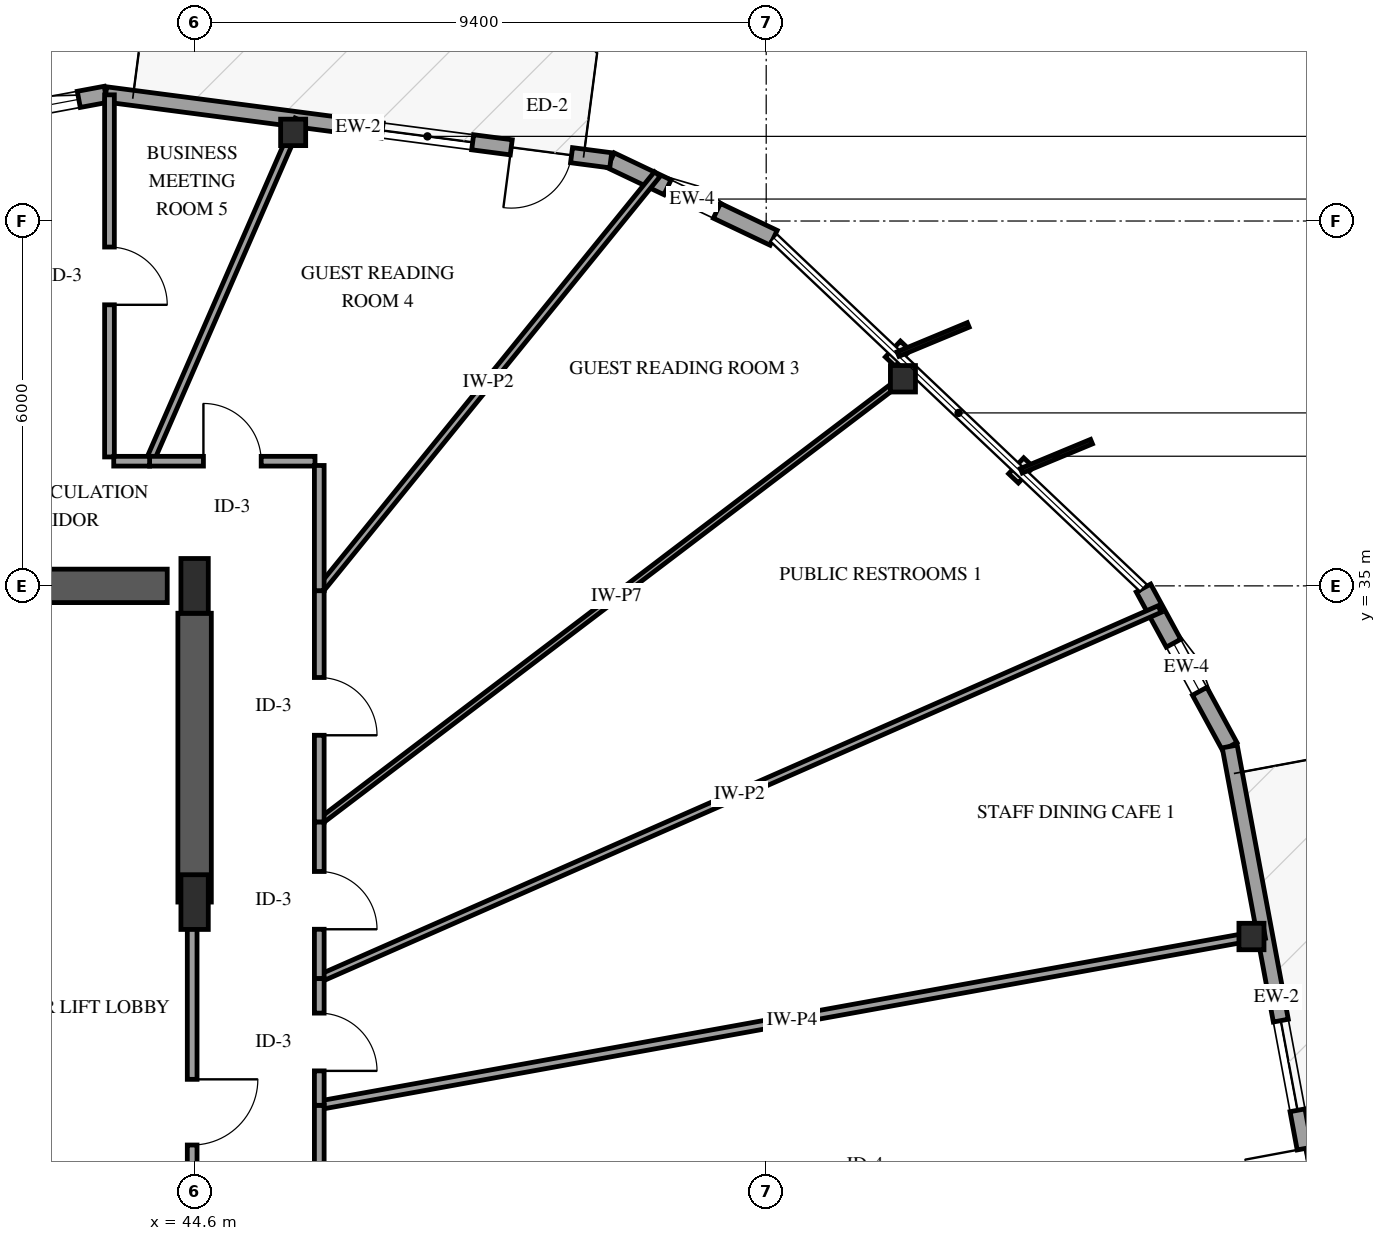
"""IFC4 building model, lengths in metres.
Left out: names, types, materials, properties, quantities, classifications, styles, units other than length and angle.
Written with IfcOpenShell. Run it as: python <this file> out.ifc"""

import sys

from ifc_helpers import new_model, si_unit, direction, frame, frame_2d, origin, origin_2d, place, context, subcontext, project, spatial, rectangle, i_section, extrude, element, fill, save


model = new_model("IFC4")
c1 = context("Model", 3, precision=1e-05, world=origin(), true_north=direction((0.0, 1.0)))
c2 = subcontext(c1, "Body", "Model", "MODEL_VIEW")
j1 = project(units=[si_unit("LENGTHUNIT", "METRE"), si_unit("PLANEANGLEUNIT", "RADIAN")], contexts=[c1])
p1 = place(None, origin())
s1 = spatial("IfcSite", under=j1, at=p1, CompositionType="ELEMENT")
p2 = place(p1, origin())
s2 = spatial("IfcBuilding", under=s1, at=p2, CompositionType="ELEMENT")
p3 = place(p2, frame((0.0, 0.0, 139.0)))
s3 = spatial("IfcBuildingStorey", under=s2, at=p3, CompositionType="ELEMENT", Elevation=139.0)
p4 = place(p3, frame((41.3, 35.0, 0.0), z_axis=(0.0, 0.0, 1.0), x_axis=(1.0, 0.0, 0.0)))
e1 = element("IfcWall", 1, at=p4, inside=s3, PredefinedType="SHEAR", context=c2, shape_type="SweptSolid", body=[
    extrude(rectangle(XDim=2.85, YDim=0.55, at=frame_2d((1.425, 0.0))), origin(), (0.0, 0.0, 1.0), 3.6),
])
p5 = place(p3, frame((44.6, 29.8, 0.0), z_axis=(0.0, 0.0, 1.0), x_axis=(0.0, 1.0, 0.0)))
e2 = element("IfcWall", 2, at=p5, inside=s3, PredefinedType="SHEAR", context=c2, shape_type="SweptSolid", body=[
    extrude(rectangle(XDim=4.75, YDim=0.55, at=frame_2d((2.375, 0.0))), origin(), (0.0, 0.0, 1.0), 3.6),
])
for number, where, z_axis, x_axis in (
    (3, (44.6, 29.8, -0.3), (0.0, 0.0, 1.0), (1.0, 0.0, 0.0)),
    (4, (44.6, 35.0, -0.3), (0.0, 0.0, 1.0), (1.0, 0.0, 0.0)),
):
    element("IfcColumn", number, at=place(p3, frame(where, z_axis=z_axis, x_axis=x_axis)), inside=s3, PredefinedType="PILASTER", context=c2, shape_type="SweptSolid", body=[
        extrude(rectangle(XDim=0.45, YDim=0.9, at=origin_2d()), origin(), (0.0, 0.0, 1.0), 3.9),
    ])
for number, where, z_axis, x_axis in (
    (5, (61.98, 29.234, -0.3), (0.0, 0.0, 1.0), (1.0, 0.0, 0.0)),
    (6, (56.249, 38.406, -0.3), (0.0, 0.0, 1.0), (1.0, 0.0, 0.0)),
    (7, (46.221, 42.458, -0.3), (0.0, 0.0, 1.0), (1.0, 0.0, 0.0)),
):
    element("IfcColumn", number, at=place(p3, frame(where, z_axis=z_axis, x_axis=x_axis)), inside=s3, PredefinedType="COLUMN", context=c2, shape_type="SweptSolid", body=[
        extrude(i_section(OverallWidth=0.412, OverallDepth=0.435, WebThickness=0.036, FlangeThickness=0.057, FilletRadius=0.038, at=origin_2d()), origin(), (0.0, 0.0, 1.0), 3.9),
    ])
p6 = place(p3, frame((54.122, 40.724, 0.0), z_axis=(0.0, 0.0, 1.0), x_axis=(-0.903059702478, 0.429515044859, 0.0)))
e8 = element("IfcWall", 8, at=p6, inside=s3, PredefinedType="SOLIDWALL", context=c2, shape_type="SweptSolid", body=[
    extrude(rectangle(XDim=2.967, YDim=0.27, at=frame_2d((1.483, 0.0))), origin(), (0.0, 0.0, 1.0), 2.679),
])
p7 = place(p6, frame((1.033, 0.0, 0.75)))
e9 = element("IfcOpeningElement", 9, at=p7, cuts=e8, PredefinedType="OPENING", context=c2, shape_type="SweptSolid", body=[
    extrude(rectangle(XDim=0.9, YDim=1.5, at=frame_2d((0.45, 0.75))), frame((0.0, 0.145, 0.0), z_axis=(0.0, -1.0, 0.0), x_axis=(1.0, 0.0, 0.0)), (0.0, 0.0, 1.0), 0.29),
])
p8 = place(p3, frame((43.138, 43.083, 0.0), z_axis=(0.0, 0.0, 1.0), x_axis=(-0.983060801599, -0.183279732538, 0.0)))
e10 = element("IfcWall", 10, at=p8, inside=s3, PredefinedType="SOLIDWALL", context=c2, shape_type="SweptSolid", body=[
    extrude(rectangle(XDim=2.967, YDim=0.27, at=frame_2d((1.483, 0.0))), origin(), (0.0, 0.0, 1.0), 2.679),
])
p9 = place(p8, frame((0.45, 0.0, 0.75)))
e11 = element("IfcOpeningElement", 11, at=p9, cuts=e10, PredefinedType="OPENING", context=c2, shape_type="SweptSolid", body=[
    extrude(rectangle(XDim=0.9, YDim=1.5, at=frame_2d((0.45, 0.75))), frame((0.0, 0.145, 0.0), z_axis=(0.0, -1.0, 0.0), x_axis=(1.0, 0.0, 0.0)), (0.0, 0.0, 1.0), 0.29),
])
p10 = place(p3, frame((51.443, 41.998, 0.0), z_axis=(0.0, 0.0, 1.0), x_axis=(-0.991579431853, 0.129499924037, 0.0)))
e12 = element("IfcWall", 12, at=p10, inside=s3, PredefinedType="SOLIDWALL", context=c2, shape_type="SweptSolid", body=[
    extrude(rectangle(XDim=8.376, YDim=0.25, at=frame_2d((4.188, 0.0))), origin(), (0.0, 0.0, 1.0), 2.679),
])
p11 = place(p10, frame((0.65, 0.0, 0.0)))
e13 = element("IfcOpeningElement", 13, at=p11, cuts=e12, PredefinedType="OPENING", context=c2, shape_type="SweptSolid", body=[
    extrude(rectangle(XDim=1.0, YDim=2.15, at=frame_2d((0.5, 1.075))), frame((0.0, 0.135, 0.0), z_axis=(0.0, -1.0, 0.0), x_axis=(1.0, 0.0, 0.0)), (0.0, 0.0, 1.0), 0.27),
])
p12 = place(p10, frame((2.29, 0.0, 0.72)))
e14 = element("IfcOpeningElement", 14, at=p12, cuts=e12, PredefinedType="OPENING", context=c2, shape_type="SweptSolid", body=[
    extrude(rectangle(XDim=1.5, YDim=1.7, at=frame_2d((0.75, 0.85))), frame((0.0, 0.135, 0.0), z_axis=(0.0, -1.0, 0.0), x_axis=(1.0, 0.0, 0.0)), (0.0, 0.0, 1.0), 0.27),
])
p13 = place(p3, frame((61.623, 32.359, 0.0), z_axis=(0.0, 0.0, 1.0), x_axis=(-0.478085030824, 0.878313556369, 0.0)))
e15 = element("IfcWall", 15, at=p13, inside=s3, PredefinedType="SOLIDWALL", context=c2, shape_type="SweptSolid", body=[
    extrude(rectangle(XDim=2.967, YDim=0.27, at=frame_2d((1.483, 0.0))), origin(), (0.0, 0.0, 1.0), 2.679),
])
p14 = place(p13, frame((1.033, 0.0, 0.75)))
e16 = element("IfcOpeningElement", 16, at=p14, cuts=e15, PredefinedType="OPENING", context=c2, shape_type="SweptSolid", body=[
    extrude(rectangle(XDim=0.9, YDim=1.5, at=frame_2d((0.45, 0.75))), frame((0.0, 0.145, 0.0), z_axis=(0.0, -1.0, 0.0), x_axis=(1.0, 0.0, 0.0)), (0.0, 0.0, 1.0), 0.29),
])
p15 = place(p3, frame((63.158, 24.125, 0.0), z_axis=(0.0, 0.0, 1.0), x_axis=(-0.183274789928, 0.983061723076, 0.0)))
e17 = element("IfcWall", 17, at=p15, inside=s3, PredefinedType="SOLIDWALL", context=c2, shape_type="SweptSolid", body=[
    extrude(rectangle(XDim=8.376, YDim=0.25, at=frame_2d((4.188, 0.0))), origin(), (0.0, 0.0, 1.0), 2.679),
])
p16 = place(p15, frame((0.65, 0.0, 0.0)))
e18 = element("IfcOpeningElement", 18, at=p16, cuts=e17, PredefinedType="OPENING", context=c2, shape_type="SweptSolid", body=[
    extrude(rectangle(XDim=1.0, YDim=2.15, at=frame_2d((0.5, 1.075))), frame((0.0, 0.135, 0.0), z_axis=(0.0, -1.0, 0.0), x_axis=(1.0, 0.0, 0.0)), (0.0, 0.0, 1.0), 0.27),
])
p17 = place(p15, frame((2.29, 0.0, 0.72)))
e19 = element("IfcOpeningElement", 19, at=p17, cuts=e17, PredefinedType="OPENING", context=c2, shape_type="SweptSolid", body=[
    extrude(rectangle(XDim=1.5, YDim=1.7, at=frame_2d((0.75, 0.85))), frame((0.0, 0.135, 0.0), z_axis=(0.0, -1.0, 0.0), x_axis=(1.0, 0.0, 0.0)), (0.0, 0.0, 1.0), 0.27),
])
p18 = place(p3, frame((62.198, 29.273, 0.0), z_axis=(0.0, 0.0, 1.0), x_axis=(-0.98400313361, -0.178151152242, 0.0)))
e20 = element("IfcWall", 20, at=p18, inside=s3, PredefinedType="PARTITIONING", context=c2, shape_type="SweptSolid", body=[
    extrude(rectangle(XDim=15.801, YDim=0.14, at=frame_2d((7.9, 0.0))), origin(), (0.0, 0.0, 1.0), 2.595),
])
p19 = place(p3, frame((46.65, 28.541, 0.0), z_axis=(0.0, 0.0, 1.0), x_axis=(0.915387028223, 0.402574947756, 0.0)))
e21 = element("IfcWall", 21, at=p19, inside=s3, PredefinedType="PARTITIONING", context=c2, shape_type="SweptSolid", body=[
    extrude(rectangle(XDim=15.097, YDim=0.12, at=frame_2d((7.549, 0.0))), origin(), (0.0, 0.0, 1.0), 3.3),
])
p20 = place(p3, frame((46.65, 31.115, 0.0), z_axis=(0.0, 0.0, 1.0), x_axis=(0.796303177003, 0.604897718871, 0.0)))
e22 = element("IfcWall", 22, at=p20, inside=s3, PredefinedType="PARTITIONING", context=c2, shape_type="SweptSolid", body=[
    extrude(rectangle(XDim=12.278, YDim=0.1, at=frame_2d((6.139, 0.0))), origin(), (0.0, 0.0, 1.0), 3.3),
])
p21 = place(p3, frame((46.65, 34.921, 0.0), z_axis=(0.0, 0.0, 1.0), x_axis=(0.630086195198, 0.776525200248, 0.0)))
e23 = element("IfcWall", 23, at=p21, inside=s3, PredefinedType="PARTITIONING", context=c2, shape_type="SweptSolid", body=[
    extrude(rectangle(XDim=8.823, YDim=0.12, at=frame_2d((4.411, 0.0))), origin(), (0.0, 0.0, 1.0), 2.678),
])
p22 = place(p3, frame((44.56, 29.8, 0.0), z_axis=(0.0, 0.0, 1.0), x_axis=(0.0, -1.0, 0.0)))
e24 = element("IfcWall", 24, at=p22, inside=s3, PredefinedType="PARTITIONING", context=c2, shape_type="SweptSolid", body=[
    extrude(rectangle(XDim=6.91, YDim=0.16, at=frame_2d((3.455, 0.0))), origin(), (0.0, 0.0, 1.0), 2.34),
])
p23 = place(p22, frame((2.915, 0.0, 0.0)))
e25 = element("IfcOpeningElement", 25, at=p23, cuts=e24, PredefinedType="OPENING", context=c2, shape_type="SweptSolid", body=[
    extrude(rectangle(XDim=1.08, YDim=2.15, at=frame_2d((0.54, 1.075))), frame((0.0, 0.09, 0.0), z_axis=(0.0, -1.0, 0.0), x_axis=(1.0, 0.0, 0.0)), (0.0, 0.0, 1.0), 0.18),
])
p24 = place(p3, frame((43.86, 37.05, 0.0), z_axis=(0.0, 0.0, 1.0), x_axis=(0.400139709892, 0.916454151918, 0.0)))
e26 = element("IfcWall", 26, at=p24, inside=s3, PredefinedType="PARTITIONING", context=c2, shape_type="SweptSolid", body=[
    extrude(rectangle(XDim=6.13, YDim=0.13, at=frame_2d((3.065, 0.0))), origin(), (0.0, 0.0, 1.0), 2.595),
])
p25 = place(p3, frame((43.2, 43.075, 0.0), z_axis=(0.0, 0.0, 1.0), x_axis=(0.0, -1.0, 0.0)))
e27 = element("IfcWall", 27, at=p25, inside=s3, PredefinedType="PARTITIONING", context=c2, shape_type="SweptSolid", body=[
    extrude(rectangle(XDim=5.955, YDim=0.16, at=frame_2d((2.978, 0.0))), origin(), (0.0, 0.0, 1.0), 2.678),
])
p26 = place(p25, frame((2.503, 0.0, 0.0)))
e28 = element("IfcOpeningElement", 28, at=p26, cuts=e27, PredefinedType="OPENING", context=c2, shape_type="SweptSolid", body=[
    extrude(rectangle(XDim=0.95, YDim=2.15, at=frame_2d((0.475, 1.075))), frame((0.0, 0.09, 0.0), z_axis=(0.0, -1.0, 0.0), x_axis=(1.0, 0.0, 0.0)), (0.0, 0.0, 1.0), 0.18),
])
p27 = place(p3, frame((46.65, 34.921, 0.0), z_axis=(0.0, 0.0, 1.0), x_axis=(0.0, -1.0, 0.0)))
e29 = element("IfcWall", 29, at=p27, inside=s3, PredefinedType="PARTITIONING", context=c2, shape_type="SweptSolid", body=[
    extrude(rectangle(XDim=3.806, YDim=0.16, at=frame_2d((1.903, 0.0))), origin(), (0.0, 0.0, 1.0), 3.3),
])
p28 = place(p27, frame((1.428, 0.0, 0.0)))
e30 = element("IfcOpeningElement", 30, at=p28, cuts=e29, PredefinedType="OPENING", context=c2, shape_type="SweptSolid", body=[
    extrude(rectangle(XDim=0.95, YDim=2.15, at=frame_2d((0.475, 1.075))), frame((0.0, 0.09, 0.0), z_axis=(0.0, -1.0, 0.0), x_axis=(1.0, 0.0, 0.0)), (0.0, 0.0, 1.0), 0.18),
])
p29 = place(p3, frame((46.65, 26.458, 0.0), z_axis=(0.0, 0.0, 1.0), x_axis=(0.0, -1.0, 0.0)))
e31 = element("IfcWall", 31, at=p29, inside=s3, PredefinedType="PARTITIONING", context=c2, shape_type="SweptSolid", body=[
    extrude(rectangle(XDim=3.79, YDim=0.16, at=frame_2d((1.895, 0.0))), origin(), (0.0, 0.0, 1.0), 3.3),
])
p30 = place(p29, frame((1.42, 0.0, 0.0)))
e32 = element("IfcOpeningElement", 32, at=p30, cuts=e31, PredefinedType="OPENING", context=c2, shape_type="SweptSolid", body=[
    extrude(rectangle(XDim=0.95, YDim=2.15, at=frame_2d((0.475, 1.075))), frame((0.0, 0.09, 0.0), z_axis=(0.0, -1.0, 0.0), x_axis=(1.0, 0.0, 0.0)), (0.0, 0.0, 1.0), 0.18),
])
p31 = place(p3, frame((43.86, 37.05, 0.0), z_axis=(0.0, 0.0, 1.0), x_axis=(1.0, 0.0, 0.0)))
e33 = element("IfcWall", 33, at=p31, inside=s3, PredefinedType="PARTITIONING", context=c2, shape_type="SweptSolid", body=[
    extrude(rectangle(XDim=2.72, YDim=0.16, at=frame_2d((1.36, 0.0))), origin(), (0.0, 0.0, 1.0), 3.3),
])
p32 = place(p31, frame((0.885, 0.0, 0.0)))
e34 = element("IfcOpeningElement", 34, at=p32, cuts=e33, PredefinedType="OPENING", context=c2, shape_type="SweptSolid", body=[
    extrude(rectangle(XDim=0.95, YDim=2.15, at=frame_2d((0.475, 1.075))), frame((0.0, 0.09, 0.0), z_axis=(0.0, -1.0, 0.0), x_axis=(1.0, 0.0, 0.0)), (0.0, 0.0, 1.0), 0.18),
])
p33 = place(p3, frame((46.65, 31.115, 0.0), z_axis=(0.0, 0.0, 1.0), x_axis=(0.0, -1.0, 0.0)))
e35 = element("IfcWall", 35, at=p33, inside=s3, PredefinedType="PARTITIONING", context=c2, shape_type="SweptSolid", body=[
    extrude(rectangle(XDim=2.574, YDim=0.16, at=frame_2d((1.287, 0.0))), origin(), (0.0, 0.0, 1.0), 3.3),
])
p34 = place(p33, frame((0.812, 0.0, 0.0)))
e36 = element("IfcOpeningElement", 36, at=p34, cuts=e35, PredefinedType="OPENING", context=c2, shape_type="SweptSolid", body=[
    extrude(rectangle(XDim=0.95, YDim=2.15, at=frame_2d((0.475, 1.075))), frame((0.0, 0.09, 0.0), z_axis=(0.0, -1.0, 0.0), x_axis=(1.0, 0.0, 0.0)), (0.0, 0.0, 1.0), 0.18),
])
p35 = place(p3, frame((46.65, 28.541, 0.0), z_axis=(0.0, 0.0, 1.0), x_axis=(0.0, -1.0, 0.0)))
e37 = element("IfcWall", 37, at=p35, inside=s3, PredefinedType="PARTITIONING", context=c2, shape_type="SweptSolid", body=[
    extrude(rectangle(XDim=2.083, YDim=0.16, at=frame_2d((1.042, 0.0))), origin(), (0.0, 0.0, 1.0), 3.3),
])
p36 = place(p35, frame((0.567, 0.0, 0.0)))
e38 = element("IfcOpeningElement", 38, at=p36, cuts=e37, PredefinedType="OPENING", context=c2, shape_type="SweptSolid", body=[
    extrude(rectangle(XDim=0.95, YDim=2.15, at=frame_2d((0.475, 1.075))), frame((0.0, 0.09, 0.0), z_axis=(0.0, -1.0, 0.0), x_axis=(1.0, 0.0, 0.0)), (0.0, 0.0, 1.0), 0.18),
])
p37 = place(p3, frame((46.65, 36.98, 0.0), z_axis=(0.0, 0.0, 1.0), x_axis=(0.0, -1.0, 0.0)))
e39 = element("IfcWall", 39, at=p37, inside=s3, PredefinedType="PARTITIONING", context=c2, shape_type="SweptSolid", body=[
    extrude(rectangle(XDim=2.059, YDim=0.16, at=frame_2d((1.03, 0.0))), origin(), (0.0, 0.0, 1.0), 3.3),
])
p38 = place(p3, frame((43.27, 37.05, 0.0), z_axis=(0.0, 0.0, 1.0), x_axis=(1.0, 0.0, 0.0)))
e40 = element("IfcWall", 40, at=p38, inside=s3, PredefinedType="PARTITIONING", context=c2, shape_type="SweptSolid", body=[
    extrude(rectangle(XDim=0.59, YDim=0.16, at=frame_2d((0.295, 0.0))), origin(), (0.0, 0.0, 1.0), 3.3),
])
p39 = place(p7, origin())
e41 = element("IfcWindow", 41, at=p39, inside=s3, PartitioningType="SINGLE_PANEL", PredefinedType="WINDOW", context=c2, shape_type="SweptSolid", body=[
    extrude(rectangle(XDim=0.9, YDim=1.5, at=frame_2d((0.45, 0.75))), frame((0.0, 0.03, 0.0), z_axis=(0.0, -1.0, 0.0), x_axis=(1.0, 0.0, 0.0)), (0.0, 0.0, 1.0), 0.06),
])
fill(e9, e41)
p40 = place(p9, origin())
e42 = element("IfcWindow", 42, at=p40, inside=s3, PartitioningType="SINGLE_PANEL", PredefinedType="WINDOW", context=c2, shape_type="SweptSolid", body=[
    extrude(rectangle(XDim=0.9, YDim=1.5, at=frame_2d((0.45, 0.75))), frame((0.0, 0.03, 0.0), z_axis=(0.0, -1.0, 0.0), x_axis=(1.0, 0.0, 0.0)), (0.0, 0.0, 1.0), 0.06),
])
fill(e11, e42)
p41 = place(p11, origin())
e43 = element("IfcDoor", 43, at=p41, inside=s3, OperationType="SINGLE_SWING_RIGHT", PredefinedType="DOOR", context=c2, shape_type="SweptSolid", body=[
    extrude(rectangle(XDim=1.0, YDim=2.15, at=frame_2d((0.5, 1.075))), frame((0.0, 0.025, 0.0), z_axis=(0.0, -1.0, 0.0), x_axis=(1.0, 0.0, 0.0)), (0.0, 0.0, 1.0), 0.05),
])
fill(e13, e43)
p42 = place(p12, origin())
e44 = element("IfcWindow", 44, at=p42, inside=s3, PartitioningType="SINGLE_PANEL", PredefinedType="WINDOW", context=c2, shape_type="SweptSolid", body=[
    extrude(rectangle(XDim=1.5, YDim=1.7, at=frame_2d((0.75, 0.85))), frame((0.0, 0.03, 0.0), z_axis=(0.0, -1.0, 0.0), x_axis=(1.0, 0.0, 0.0)), (0.0, 0.0, 1.0), 0.06),
])
fill(e14, e44)
p43 = place(p14, origin())
e45 = element("IfcWindow", 45, at=p43, inside=s3, PartitioningType="SINGLE_PANEL", PredefinedType="WINDOW", context=c2, shape_type="SweptSolid", body=[
    extrude(rectangle(XDim=0.9, YDim=1.5, at=frame_2d((0.45, 0.75))), frame((0.0, 0.03, 0.0), z_axis=(0.0, -1.0, 0.0), x_axis=(1.0, 0.0, 0.0)), (0.0, 0.0, 1.0), 0.06),
])
fill(e16, e45)
p44 = place(p16, origin())
e46 = element("IfcDoor", 46, at=p44, inside=s3, OperationType="SINGLE_SWING_RIGHT", PredefinedType="DOOR", context=c2, shape_type="SweptSolid", body=[
    extrude(rectangle(XDim=1.0, YDim=2.15, at=frame_2d((0.5, 1.075))), frame((0.0, 0.025, 0.0), z_axis=(0.0, -1.0, 0.0), x_axis=(1.0, 0.0, 0.0)), (0.0, 0.0, 1.0), 0.05),
])
fill(e18, e46)
p45 = place(p17, origin())
e47 = element("IfcWindow", 47, at=p45, inside=s3, PartitioningType="SINGLE_PANEL", PredefinedType="WINDOW", context=c2, shape_type="SweptSolid", body=[
    extrude(rectangle(XDim=1.5, YDim=1.7, at=frame_2d((0.75, 0.85))), frame((0.0, 0.03, 0.0), z_axis=(0.0, -1.0, 0.0), x_axis=(1.0, 0.0, 0.0)), (0.0, 0.0, 1.0), 0.06),
])
fill(e19, e47)
p46 = place(p23, origin())
e48 = element("IfcDoor", 48, at=p46, inside=s3, OperationType="SINGLE_SWING_LEFT", PredefinedType="DOOR", context=c2, shape_type="SweptSolid", body=[
    extrude(rectangle(XDim=1.08, YDim=2.15, at=frame_2d((0.54, 1.075))), frame((0.0, 0.025, 0.0), z_axis=(0.0, -1.0, 0.0), x_axis=(1.0, 0.0, 0.0)), (0.0, 0.0, 1.0), 0.05),
])
fill(e25, e48)
p47 = place(p26, origin())
e49 = element("IfcDoor", 49, at=p47, inside=s3, OperationType="SINGLE_SWING_RIGHT", PredefinedType="DOOR", context=c2, shape_type="SweptSolid", body=[
    extrude(rectangle(XDim=0.95, YDim=2.15, at=frame_2d((0.475, 1.075))), frame((0.0, 0.025, 0.0), z_axis=(0.0, -1.0, 0.0), x_axis=(1.0, 0.0, 0.0)), (0.0, 0.0, 1.0), 0.05),
])
fill(e28, e49)
p48 = place(p28, origin())
e50 = element("IfcDoor", 50, at=p48, inside=s3, OperationType="SINGLE_SWING_RIGHT", PredefinedType="DOOR", context=c2, shape_type="SweptSolid", body=[
    extrude(rectangle(XDim=0.95, YDim=2.15, at=frame_2d((0.475, 1.075))), frame((0.0, 0.025, 0.0), z_axis=(0.0, -1.0, 0.0), x_axis=(1.0, 0.0, 0.0)), (0.0, 0.0, 1.0), 0.05),
])
fill(e30, e50)
p49 = place(p32, origin())
e51 = element("IfcDoor", 51, at=p49, inside=s3, OperationType="SINGLE_SWING_LEFT", PredefinedType="DOOR", context=c2, shape_type="SweptSolid", body=[
    extrude(rectangle(XDim=0.95, YDim=2.15, at=frame_2d((0.475, 1.075))), frame((0.0, 0.025, 0.0), z_axis=(0.0, -1.0, 0.0), x_axis=(1.0, 0.0, 0.0)), (0.0, 0.0, 1.0), 0.05),
])
fill(e34, e51)
p50 = place(p34, origin())
e52 = element("IfcDoor", 52, at=p50, inside=s3, OperationType="SINGLE_SWING_RIGHT", PredefinedType="DOOR", context=c2, shape_type="SweptSolid", body=[
    extrude(rectangle(XDim=0.95, YDim=2.15, at=frame_2d((0.475, 1.075))), frame((0.0, 0.025, 0.0), z_axis=(0.0, -1.0, 0.0), x_axis=(1.0, 0.0, 0.0)), (0.0, 0.0, 1.0), 0.05),
])
fill(e36, e52)
p51 = place(p36, origin())
e53 = element("IfcDoor", 53, at=p51, inside=s3, OperationType="SINGLE_SWING_RIGHT", PredefinedType="DOOR", context=c2, shape_type="SweptSolid", body=[
    extrude(rectangle(XDim=0.95, YDim=2.15, at=frame_2d((0.475, 1.075))), frame((0.0, 0.025, 0.0), z_axis=(0.0, -1.0, 0.0), x_axis=(1.0, 0.0, 0.0)), (0.0, 0.0, 1.0), 0.05),
])
fill(e38, e53)
save(model, sys.argv[1])
